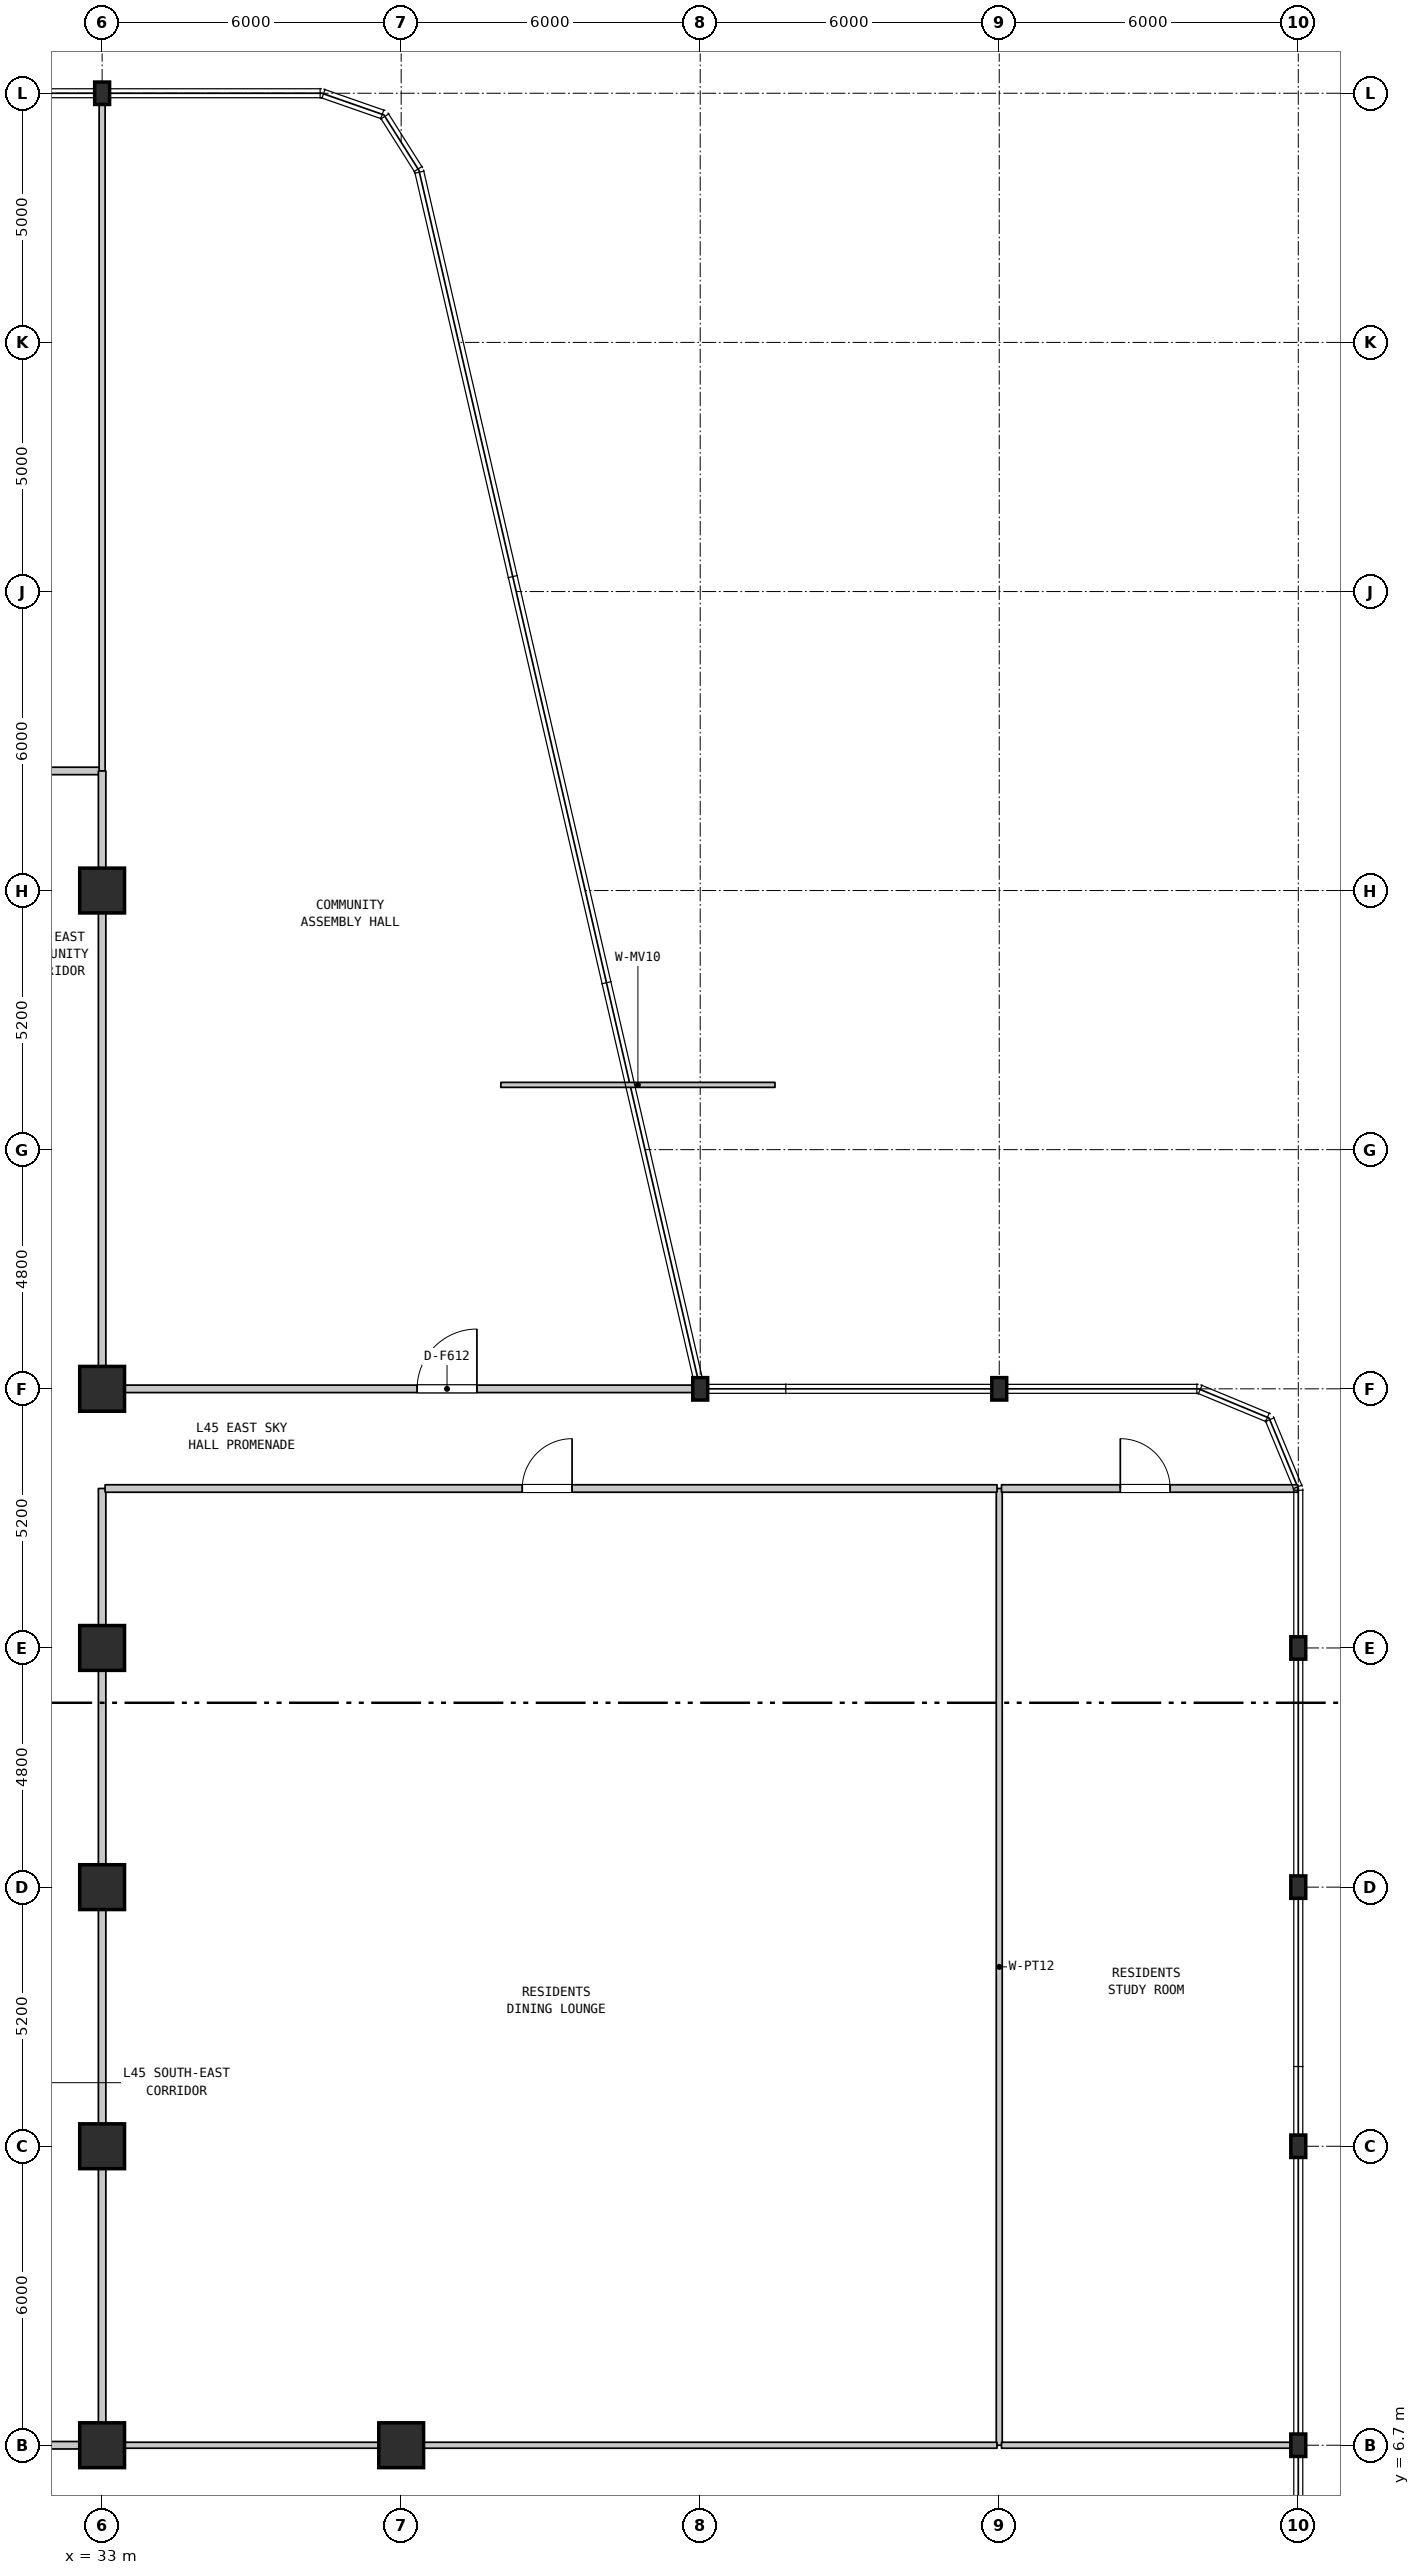
"""IFC4 building model, lengths in metres.
Left out: names, types, materials, properties, quantities, classifications, styles, units other than length and angle.
Written with IfcOpenShell. Run it as: python <this file> out.ifc"""

import sys

from ifc_helpers import new_model, si_unit, direction, frame, frame_2d, origin, origin_2d, place, context, subcontext, project, spatial, rectangle, i_section, extrude, element, fill, save


model = new_model("IFC4")
c1 = context("Model", 3, precision=1e-05, world=origin(), true_north=direction((0.0, 1.0)))
c2 = subcontext(c1, "Body", "Model", "MODEL_VIEW")
j1 = project(units=[si_unit("LENGTHUNIT", "METRE"), si_unit("PLANEANGLEUNIT", "RADIAN")], contexts=[c1])
p1 = place(None, origin())
s1 = spatial("IfcSite", under=j1, at=p1, CompositionType="ELEMENT")
p2 = place(p1, origin())
s2 = spatial("IfcBuilding", under=s1, at=p2, CompositionType="ELEMENT")
p3 = place(p2, frame((0.0, 0.0, 183.9)))
s3 = spatial("IfcBuildingStorey", under=s2, at=p3, CompositionType="ELEMENT", Elevation=183.9)
for number, where, z_axis, x_axis in (
    (1, (33.0, 6.7, 0.0), (0.0, 0.0, 1.0), (1.0, 0.0, 0.0)),
    (2, (33.0, 12.7, 0.0), (0.0, 0.0, 1.0), (1.0, 0.0, 0.0)),
    (3, (33.0, 17.9, 0.0), (0.0, 0.0, 1.0), (1.0, 0.0, 0.0)),
    (4, (33.0, 22.7, 0.0), (0.0, 0.0, 1.0), (1.0, 0.0, 0.0)),
    (5, (33.0, 27.9, 0.0), (0.0, 0.0, 1.0), (1.0, 0.0, 0.0)),
    (6, (33.0, 37.9, 0.0), (0.0, 0.0, 1.0), (1.0, 0.0, 0.0)),
):
    element("IfcColumn", number, at=place(p3, frame(where, z_axis=z_axis, x_axis=x_axis)), inside=s3, PredefinedType="COLUMN", context=c2, shape_type="SweptSolid", body=[
        extrude(rectangle(XDim=0.9, YDim=0.9, at=origin_2d()), origin(), (0.0, 0.0, 1.0), 4.5),
    ])
p4 = place(p3, frame((33.0, 53.9, 0.0), z_axis=(0.0, 0.0, 1.0), x_axis=(1.0, 0.0, 0.0)))
e7 = element("IfcColumn", 7, at=p4, inside=s3, PredefinedType="COLUMN", context=c2, shape_type="SweptSolid", body=[
    extrude(i_section(OverallWidth=0.3, OverallDepth=0.45, WebThickness=0.014, FlangeThickness=0.026, FilletRadius=0.027, at=origin_2d()), origin(), (0.0, 0.0, 1.0), 4.5),
])
p5 = place(p3, frame((39.0, 6.7, 0.0), z_axis=(0.0, 0.0, 1.0), x_axis=(1.0, 0.0, 0.0)))
e8 = element("IfcColumn", 8, at=p5, inside=s3, PredefinedType="COLUMN", context=c2, shape_type="SweptSolid", body=[
    extrude(rectangle(XDim=0.9, YDim=0.9, at=origin_2d()), origin(), (0.0, 0.0, 1.0), 4.5),
])
for number, where, z_axis, x_axis in (
    (9, (45.0, 27.9, 0.0), (0.0, 0.0, 1.0), (1.0, 0.0, 0.0)),
    (10, (51.0, 27.9, 0.0), (0.0, 0.0, 1.0), (1.0, 0.0, 0.0)),
    (11, (57.0, 6.7, 0.0), (0.0, 0.0, 1.0), (1.0, 0.0, 0.0)),
    (12, (57.0, 12.7, 0.0), (0.0, 0.0, 1.0), (1.0, 0.0, 0.0)),
    (13, (57.0, 17.9, 0.0), (0.0, 0.0, 1.0), (1.0, 0.0, 0.0)),
    (14, (57.0, 22.7, 0.0), (0.0, 0.0, 1.0), (1.0, 0.0, 0.0)),
):
    element("IfcColumn", number, at=place(p3, frame(where, z_axis=z_axis, x_axis=x_axis)), inside=s3, PredefinedType="COLUMN", context=c2, shape_type="SweptSolid", body=[
        extrude(i_section(OverallWidth=0.3, OverallDepth=0.45, WebThickness=0.014, FlangeThickness=0.026, FilletRadius=0.027, at=origin_2d()), origin(), (0.0, 0.0, 1.0), 4.5),
    ])
p6 = place(p3, frame((33.0, 6.7, 0.0), z_axis=(0.0, 0.0, 1.0), x_axis=(0.0, 1.0, 0.0)))
e15 = element("IfcWall", 15, at=p6, inside=s3, PredefinedType="STANDARD", context=c2, shape_type="SweptSolid", body=[
    extrude(rectangle(XDim=19.2, YDim=0.15, at=frame_2d((9.6, 0.0))), origin(), (0.0, 0.0, 1.0), 3.79),
])
p7 = place(p3, frame((33.0, 27.9, 0.0), z_axis=(0.0, 0.0, 1.0), x_axis=(0.0, 1.0, 0.0)))
e16 = element("IfcWall", 16, at=p7, inside=s3, PredefinedType="STANDARD", context=c2, shape_type="SweptSolid", body=[
    extrude(rectangle(XDim=10.0, YDim=0.15, at=frame_2d((5.0, 0.0))), origin(), (0.0, 0.0, 1.0), 3.69),
])
p8 = place(p3, frame((33.0, 40.3, 0.0), z_axis=(0.0, 0.0, 1.0), x_axis=(0.0, 1.0, 0.0)))
e17 = element("IfcWall", 17, at=p8, inside=s3, PredefinedType="PARTITIONING", context=c2, shape_type="SweptSolid", body=[
    extrude(rectangle(XDim=13.59, YDim=0.12, at=frame_2d((6.795, 0.0))), origin(), (0.0, 0.0, 1.0), 3.59),
])
p9 = place(p3, frame((51.0, 6.7, 0.0), z_axis=(0.0, 0.0, 1.0), x_axis=(0.0, 1.0, 0.0)))
e18 = element("IfcWall", 18, at=p9, inside=s3, PredefinedType="PARTITIONING", context=c2, shape_type="SweptSolid", body=[
    extrude(rectangle(XDim=19.2, YDim=0.12, at=frame_2d((9.6, 0.0))), origin(), (0.0, 0.0, 1.0), 4.19),
])
p10 = place(p3, frame((21.01, 6.7, 0.0), z_axis=(0.0, 0.0, 1.0), x_axis=(1.0, 0.0, 0.0)))
e19 = element("IfcWall", 19, at=p10, inside=s3, PredefinedType="STANDARD", context=c2, shape_type="SweptSolid", body=[
    extrude(rectangle(XDim=11.93, YDim=0.15, at=frame_2d((5.965, 0.0))), origin(), (0.0, 0.0, 1.0), 3.89),
])
p11 = place(p10, frame((4.325, 0.0, 0.0)))
e20 = element("IfcOpeningElement", 20, at=p11, cuts=e19, PredefinedType="OPENING", context=c2, shape_type="SweptSolid", body=[
    extrude(rectangle(XDim=1.0, YDim=2.15, at=frame_2d((0.5, 1.075))), frame((0.0, 0.085, 0.0), z_axis=(0.0, -1.0, 0.0), x_axis=(1.0, 0.0, 0.0)), (0.0, 0.0, 1.0), 0.17),
])
p12 = place(p3, frame((33.06, 6.7, 0.0), z_axis=(0.0, 0.0, 1.0), x_axis=(1.0, 0.0, 0.0)))
e21 = element("IfcWall", 21, at=p12, inside=s3, PredefinedType="PARTITIONING", context=c2, shape_type="SweptSolid", body=[
    extrude(rectangle(XDim=5.94, YDim=0.12, at=frame_2d((2.97, 0.0))), origin(), (0.0, 0.0, 1.0), 3.89),
])
p13 = place(p3, frame((51.045, 6.7, 0.0), z_axis=(0.0, 0.0, 1.0), x_axis=(1.0, 0.0, 0.0)))
e22 = element("IfcWall", 22, at=p13, inside=s3, PredefinedType="PARTITIONING", context=c2, shape_type="SweptSolid", body=[
    extrude(rectangle(XDim=5.945, YDim=0.12, at=frame_2d((2.973, 0.0))), origin(), (0.0, 0.0, 1.0), 3.59),
])
p14 = place(p3, frame((33.06, 25.9, 0.0), z_axis=(0.0, 0.0, 1.0), x_axis=(1.0, 0.0, 0.0)))
e23 = element("IfcWall", 23, at=p14, inside=s3, PredefinedType="STANDARD", context=c2, shape_type="SweptSolid", body=[
    extrude(rectangle(XDim=17.895, YDim=0.15, at=frame_2d((8.948, 0.0))), origin(), (0.0, 0.0, 1.0), 4.19),
])
p15 = place(p14, frame((8.369, 0.0, 0.0)))
e24 = element("IfcOpeningElement", 24, at=p15, cuts=e23, PredefinedType="OPENING", context=c2, shape_type="SweptSolid", body=[
    extrude(rectangle(XDim=1.0, YDim=2.15, at=frame_2d((0.5, 1.075))), frame((0.0, 0.085, 0.0), z_axis=(0.0, -1.0, 0.0), x_axis=(1.0, 0.0, 0.0)), (0.0, 0.0, 1.0), 0.17),
])
p16 = place(p3, frame((51.045, 25.9, 0.0), z_axis=(0.0, 0.0, 1.0), x_axis=(1.0, 0.0, 0.0)))
e25 = element("IfcWall", 25, at=p16, inside=s3, PredefinedType="STANDARD", context=c2, shape_type="SweptSolid", body=[
    extrude(rectangle(XDim=5.945, YDim=0.15, at=frame_2d((2.973, 0.0))), origin(), (0.0, 0.0, 1.0), 4.19),
])
p17 = place(p16, frame((2.384, 0.0, 0.0)))
e26 = element("IfcOpeningElement", 26, at=p17, cuts=e25, PredefinedType="OPENING", context=c2, shape_type="SweptSolid", body=[
    extrude(rectangle(XDim=1.0, YDim=2.15, at=frame_2d((0.5, 1.075))), frame((0.0, 0.085, 0.0), z_axis=(0.0, -1.0, 0.0), x_axis=(1.0, 0.0, 0.0)), (0.0, 0.0, 1.0), 0.17),
])
p18 = place(p3, frame((33.06, 27.9, 0.0), z_axis=(0.0, 0.0, 1.0), x_axis=(1.0, 0.0, 0.0)))
e27 = element("IfcWall", 27, at=p18, inside=s3, PredefinedType="STANDARD", context=c2, shape_type="SweptSolid", body=[
    extrude(rectangle(XDim=11.93, YDim=0.15, at=frame_2d((5.965, 0.0))), origin(), (0.0, 0.0, 1.0), 3.69),
])
p19 = place(p18, frame((6.26, 0.0, 0.0)))
e28 = element("IfcOpeningElement", 28, at=p19, cuts=e27, PredefinedType="OPENING", context=c2, shape_type="SweptSolid", body=[
    extrude(rectangle(XDim=1.2, YDim=2.2, at=frame_2d((0.6, 1.1))), frame((0.0, 0.085, 0.0), z_axis=(0.0, -1.0, 0.0), x_axis=(1.0, 0.0, 0.0)), (0.0, 0.0, 1.0), 0.17),
])
p20 = place(p3, frame((15.03, 40.3, 0.0), z_axis=(0.0, 0.0, 1.0), x_axis=(1.0, 0.0, 0.0)))
e29 = element("IfcWall", 29, at=p20, inside=s3, PredefinedType="STANDARD", context=c2, shape_type="SweptSolid", body=[
    extrude(rectangle(XDim=17.91, YDim=0.15, at=frame_2d((8.955, 0.0))), origin(), (0.0, 0.0, 1.0), 4.19),
])
p21 = place(p20, frame((9.22, 0.0, 0.0)))
e30 = element("IfcOpeningElement", 30, at=p21, cuts=e29, PredefinedType="OPENING", context=c2, shape_type="SweptSolid", body=[
    extrude(rectangle(XDim=1.0, YDim=2.15, at=frame_2d((0.5, 1.075))), frame((0.0, 0.085, 0.0), z_axis=(0.0, -1.0, 0.0), x_axis=(1.0, 0.0, 0.0)), (0.0, 0.0, 1.0), 0.17),
])
p22 = place(p3, frame((41.0, 34.0, 0.0), z_axis=(0.0, 0.0, 1.0), x_axis=(1.0, 0.0, 0.0)))
e31 = element("IfcWall", 31, at=p22, inside=s3, PredefinedType="MOVABLE", context=c2, shape_type="SweptSolid", body=[
    extrude(rectangle(XDim=5.5, YDim=0.1, at=frame_2d((2.75, 0.0))), origin(), (0.0, 0.0, 1.0), 4.14),
])
p23 = place(p3, frame((33.0, 37.9, 0.0), z_axis=(0.0, 0.0, 1.0), x_axis=(0.0, 1.0, 0.0)))
e32 = element("IfcWall", 32, at=p23, inside=s3, PredefinedType="STANDARD", context=c2, shape_type="SweptSolid", body=[
    extrude(rectangle(XDim=2.4, YDim=0.15, at=frame_2d((1.2, 0.0))), origin(), (0.0, 0.0, 1.0), 3.59),
])
p24 = place(p3, frame((39.0, 6.7, 0.0), z_axis=(0.0, 0.0, 1.0), x_axis=(1.0, 0.0, 0.0)))
e33 = element("IfcWall", 33, at=p24, inside=s3, PredefinedType="PARTITIONING", context=c2, shape_type="SweptSolid", body=[
    extrude(rectangle(XDim=11.955, YDim=0.12, at=frame_2d((5.978, 0.0))), origin(), (0.0, 0.0, 1.0), 3.59),
])
p25 = place(p15, origin())
e34 = element("IfcDoor", 34, at=p25, inside=s3, OperationType="SINGLE_SWING_RIGHT", PredefinedType="DOOR", context=c2, shape_type="SweptSolid", body=[
    extrude(rectangle(XDim=1.0, YDim=2.15, at=frame_2d((0.5, 1.075))), frame((0.0, 0.025, 0.0), z_axis=(0.0, -1.0, 0.0), x_axis=(1.0, 0.0, 0.0)), (0.0, 0.0, 1.0), 0.05),
])
fill(e24, e34)
p26 = place(p17, origin())
e35 = element("IfcDoor", 35, at=p26, inside=s3, OperationType="SINGLE_SWING_LEFT", PredefinedType="DOOR", context=c2, shape_type="SweptSolid", body=[
    extrude(rectangle(XDim=1.0, YDim=2.15, at=frame_2d((0.5, 1.075))), frame((0.0, 0.025, 0.0), z_axis=(0.0, -1.0, 0.0), x_axis=(1.0, 0.0, 0.0)), (0.0, 0.0, 1.0), 0.05),
])
fill(e26, e35)
p27 = place(p19, origin())
e36 = element("IfcDoor", 36, at=p27, inside=s3, OperationType="SINGLE_SWING_RIGHT", PredefinedType="DOOR", context=c2, shape_type="SweptSolid", body=[
    extrude(rectangle(XDim=1.2, YDim=2.2, at=frame_2d((0.6, 1.1))), frame((0.0, 0.025, 0.0), z_axis=(0.0, -1.0, 0.0), x_axis=(1.0, 0.0, 0.0)), (0.0, 0.0, 1.0), 0.05),
])
fill(e28, e36)
save(model, sys.argv[1])
